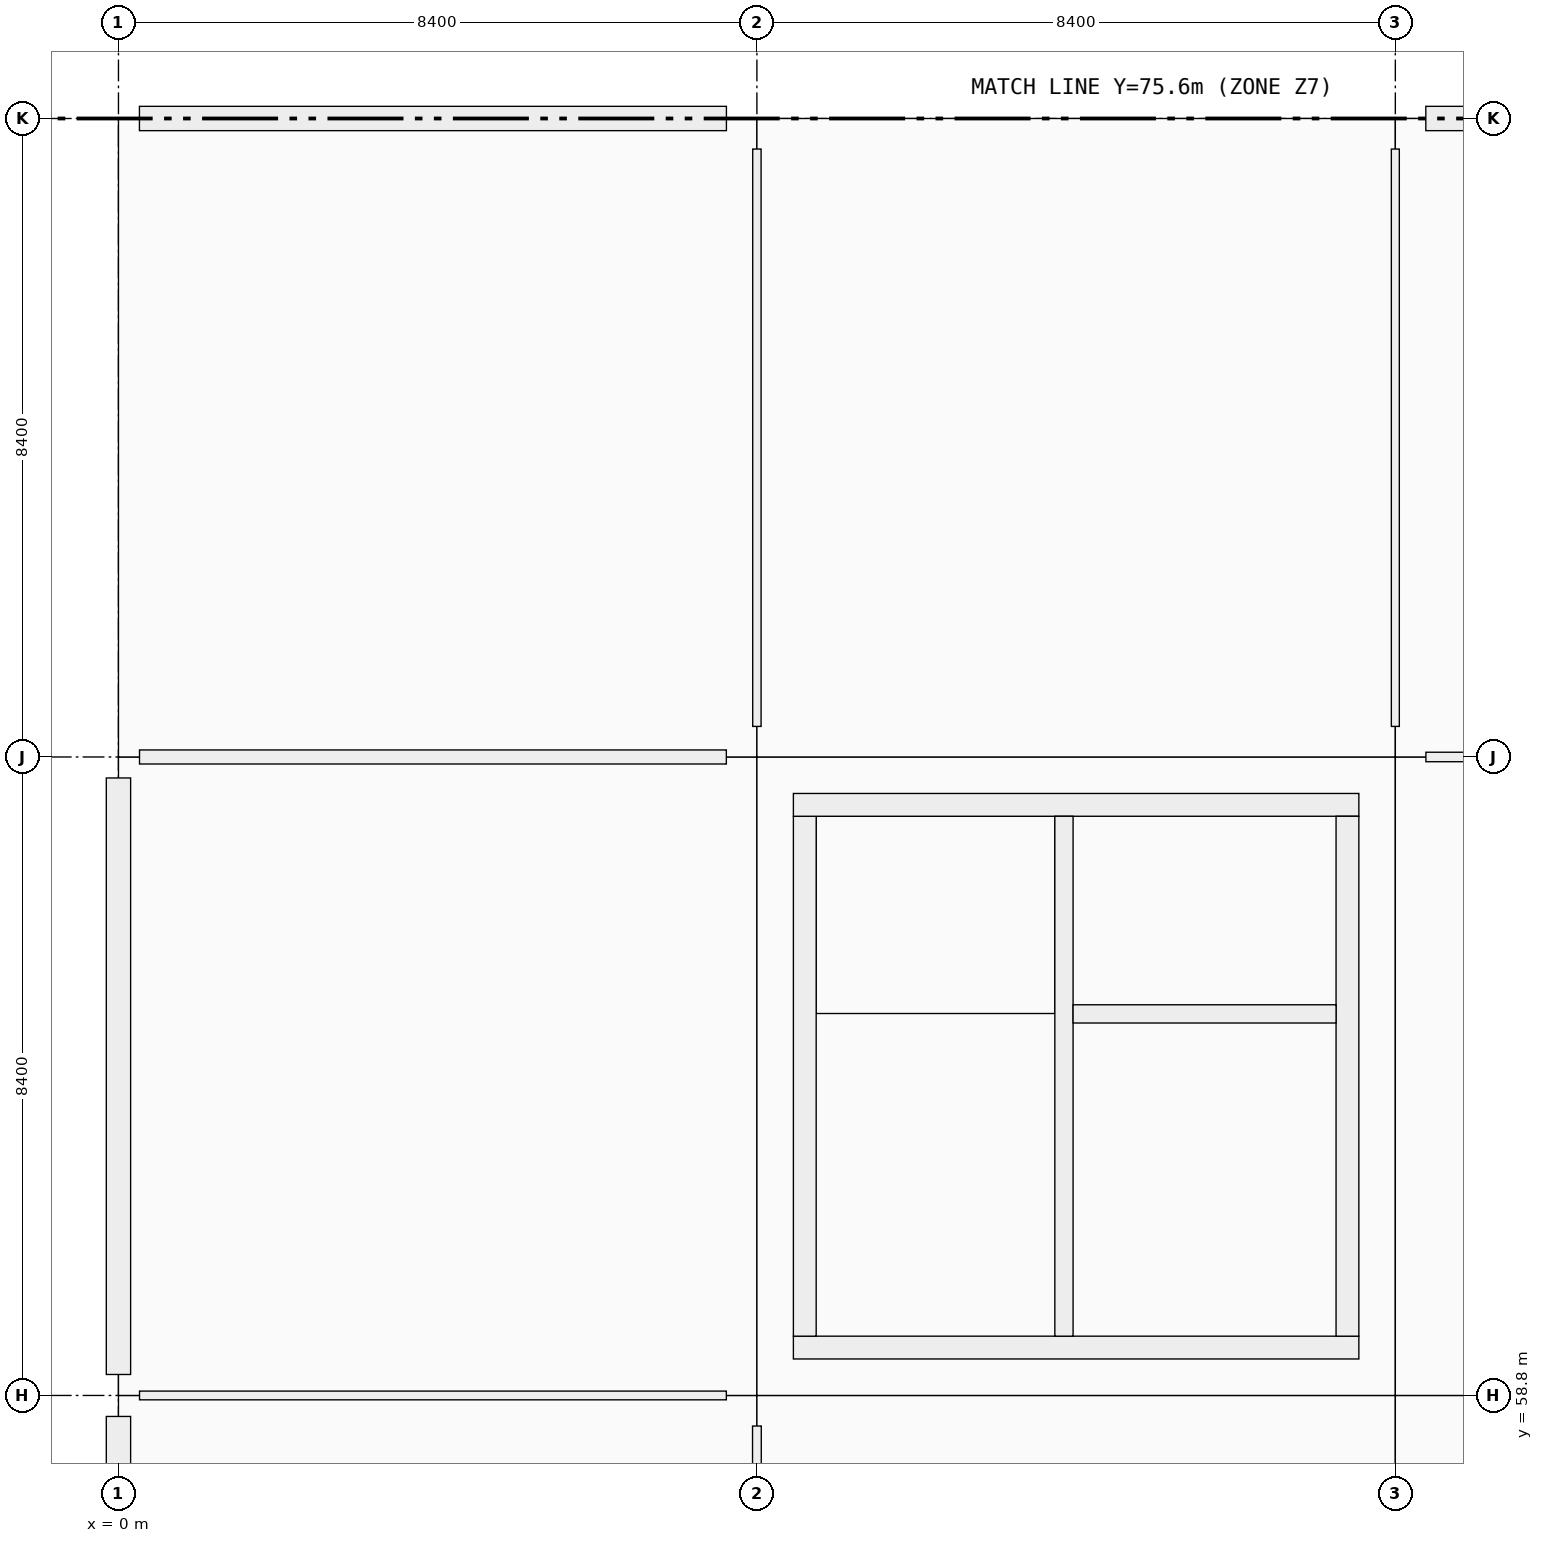
"""IFC4 building model, lengths in metres.
Left out: names, types, materials, properties, quantities, classifications, styles, units other than length and angle.
Written with IfcOpenShell. Run it as: python <this file> out.ifc"""

import sys

from ifc_helpers import new_model, si_unit, direction, frame, frame_2d, origin, origin_2d, place, context, subcontext, project, spatial, rectangle, extrude, element, fill, save


model = new_model("IFC4")
c1 = context("Model", 3, precision=1e-05, world=origin(), true_north=direction((0.0, 1.0)))
c2 = subcontext(c1, "Body", "Model", "MODEL_VIEW")
j1 = project(units=[si_unit("LENGTHUNIT", "METRE"), si_unit("PLANEANGLEUNIT", "RADIAN")], contexts=[c1])
p1 = place(None, origin())
s1 = spatial("IfcSite", under=j1, at=p1, CompositionType="ELEMENT")
p2 = place(p1, origin())
s2 = spatial("IfcBuilding", under=s1, at=p2, CompositionType="ELEMENT")
p3 = place(p2, frame((0.0, 0.0, 5.76)))
s3 = spatial("IfcBuildingStorey", under=s2, at=p3, CompositionType="ELEMENT", Elevation=5.76)
for number, where, z_axis, x_axis in (
    (1, (0.0, 58.8, 0.0), (0.0, 0.0, 1.0), (1.0, 0.0, 0.0)),
    (2, (0.0, 67.2, 0.0), (0.0, 0.0, 1.0), (1.0, 0.0, 0.0)),
    (3, (0.0, 75.6, 0.0), (0.0, 0.0, 1.0), (1.0, 0.0, 0.0)),
):
    element("IfcColumn", number, at=place(p3, frame(where, z_axis=z_axis, x_axis=x_axis)), inside=s3, PredefinedType="COLUMN", context=c2, shape_type="SweptSolid", body=[
        extrude(rectangle(XDim=0.55, YDim=0.55, at=origin_2d()), origin(), (0.0, 0.0, 1.0), 4.2),
    ])
for number, where, z_axis, x_axis in (
    (4, (8.4, 58.8, 0.0), (0.0, 0.0, 1.0), (1.0, 0.0, 0.0)),
    (5, (8.4, 67.2, 0.0), (0.0, 0.0, 1.0), (1.0, 0.0, 0.0)),
    (6, (8.4, 75.6, 0.0), (0.0, 0.0, 1.0), (1.0, 0.0, 0.0)),
    (7, (16.8, 58.8, 0.0), (0.0, 0.0, 1.0), (1.0, 0.0, 0.0)),
    (8, (16.8, 67.2, 0.0), (0.0, 0.0, 1.0), (1.0, 0.0, 0.0)),
    (9, (16.8, 75.6, 0.0), (0.0, 0.0, 1.0), (1.0, 0.0, 0.0)),
):
    element("IfcColumn", number, at=place(p3, frame(where, z_axis=z_axis, x_axis=x_axis)), inside=s3, PredefinedType="COLUMN", context=c2, shape_type="SweptSolid", body=[
        extrude(rectangle(XDim=0.8, YDim=0.8, at=origin_2d()), origin(), (0.0, 0.0, 1.0), 4.5),
    ])
p4 = place(p3, frame((0.0, 50.676, 0.0), z_axis=(0.0, 0.0, 1.0), x_axis=(0.0, 1.0, 0.0)))
e10 = element("IfcWall", 10, at=p4, inside=s3, PredefinedType="SOLIDWALL", context=c2, shape_type="SweptSolid", body=[
    extrude(rectangle(XDim=7.848, YDim=0.32, at=frame_2d((3.924, 0.0))), origin(), (0.0, 0.0, 1.0), 3.4),
])
p5 = place(p4, frame((2.674, 0.0, 0.9)))
e11 = element("IfcOpeningElement", 11, at=p5, cuts=e10, PredefinedType="OPENING", context=c2, shape_type="SweptSolid", body=[
    extrude(rectangle(XDim=2.5, YDim=1.65, at=frame_2d((1.25, 0.825))), frame((0.0, 0.16, 0.0), z_axis=(0.0, -1.0, 0.0), x_axis=(1.0, 0.0, 0.0)), (0.0, 0.0, 1.0), 0.32),
])
p6 = place(p3, frame((0.0, 59.076, 0.0), z_axis=(0.0, 0.0, 1.0), x_axis=(0.0, 1.0, 0.0)))
e12 = element("IfcWall", 12, at=p6, inside=s3, PredefinedType="SOLIDWALL", context=c2, shape_type="SweptSolid", body=[
    extrude(rectangle(XDim=7.848, YDim=0.32, at=frame_2d((3.924, 0.0))), origin(), (0.0, 0.0, 1.0), 3.4),
])
p7 = place(p6, frame((2.724, 0.0, 0.9)))
e13 = element("IfcOpeningElement", 13, at=p7, cuts=e12, PredefinedType="OPENING", context=c2, shape_type="SweptSolid", body=[
    extrude(rectangle(XDim=2.4, YDim=2.25, at=frame_2d((1.2, 1.125))), frame((0.0, 0.16, 0.0), z_axis=(0.0, -1.0, 0.0), x_axis=(1.0, 0.0, 0.0)), (0.0, 0.0, 1.0), 0.32),
])
p8 = place(p3, frame((0.276, 75.6, 0.0), z_axis=(0.0, 0.0, 1.0), x_axis=(1.0, 0.0, 0.0)))
e14 = element("IfcWall", 14, at=p8, inside=s3, PredefinedType="SOLIDWALL", context=c2, shape_type="SweptSolid", body=[
    extrude(rectangle(XDim=7.723, YDim=0.32, at=frame_2d((3.862, 0.0))), origin(), (0.0, 0.0, 1.0), 3.4),
])
p9 = place(p8, frame((2.861, 0.0, 0.9)))
e15 = element("IfcOpeningElement", 15, at=p9, cuts=e14, PredefinedType="OPENING", context=c2, shape_type="SweptSolid", body=[
    extrude(rectangle(XDim=2.0, YDim=2.25, at=frame_2d((1.0, 1.125))), frame((0.0, 0.16, 0.0), z_axis=(0.0, -1.0, 0.0), x_axis=(1.0, 0.0, 0.0)), (0.0, 0.0, 1.0), 0.32),
])
p10 = place(p3, frame((17.201, 75.6, 0.0), z_axis=(0.0, 0.0, 1.0), x_axis=(1.0, 0.0, 0.0)))
e16 = element("IfcWall", 16, at=p10, inside=s3, PredefinedType="SOLIDWALL", context=c2, shape_type="SweptSolid", body=[
    extrude(rectangle(XDim=7.598, YDim=0.32, at=frame_2d((3.799, 0.0))), origin(), (0.0, 0.0, 1.0), 3.4),
])
p11 = place(p10, frame((3.049, 0.0, 0.9)))
e17 = element("IfcOpeningElement", 17, at=p11, cuts=e16, PredefinedType="OPENING", context=c2, shape_type="SweptSolid", body=[
    extrude(rectangle(XDim=1.5, YDim=1.2, at=frame_2d((0.75, 0.6))), frame((0.0, 0.16, 0.0), z_axis=(0.0, -1.0, 0.0), x_axis=(1.0, 0.0, 0.0)), (0.0, 0.0, 1.0), 0.32),
])
p12 = place(p3, frame((16.32, 59.43, 0.0), z_axis=(0.0, 0.0, 1.0), x_axis=(-1.0, 0.0, 0.0)))
e18 = element("IfcWall", 18, at=p12, inside=s3, PredefinedType="SHEAR", context=c2, shape_type="SweptSolid", body=[
    extrude(rectangle(XDim=7.44, YDim=0.3, at=frame_2d((3.72, 0.0))), origin(), (0.0, 0.0, 1.0), 4.5),
])
p13 = place(p12, frame((1.28, 0.0, 0.0)))
e19 = element("IfcOpeningElement", 19, at=p13, cuts=e18, PredefinedType="OPENING", context=c2, shape_type="SweptSolid", body=[
    extrude(rectangle(XDim=1.5, YDim=2.15, at=frame_2d((0.75, 1.075))), frame((0.0, 0.15, 0.0), z_axis=(0.0, -1.0, 0.0), x_axis=(1.0, 0.0, 0.0)), (0.0, 0.0, 1.0), 0.3),
])
p14 = place(p3, frame((9.03, 59.58, 0.0), z_axis=(0.0, 0.0, 1.0), x_axis=(0.0, 1.0, 0.0)))
e20 = element("IfcWall", 20, at=p14, inside=s3, PredefinedType="SHEAR", context=c2, shape_type="SweptSolid", body=[
    extrude(rectangle(XDim=6.84, YDim=0.3, at=frame_2d((3.42, 0.0))), origin(), (0.0, 0.0, 1.0), 4.5),
])
p15 = place(p3, frame((8.88, 66.57, 0.0), z_axis=(0.0, 0.0, 1.0), x_axis=(1.0, 0.0, 0.0)))
e21 = element("IfcWall", 21, at=p15, inside=s3, PredefinedType="SHEAR", context=c2, shape_type="SweptSolid", body=[
    extrude(rectangle(XDim=7.44, YDim=0.3, at=frame_2d((3.72, 0.0))), origin(), (0.0, 0.0, 1.0), 4.5),
])
p16 = place(p3, frame((16.17, 66.42, 0.0), z_axis=(0.0, 0.0, 1.0), x_axis=(0.0, -1.0, 0.0)))
e22 = element("IfcWall", 22, at=p16, inside=s3, PredefinedType="SHEAR", context=c2, shape_type="SweptSolid", body=[
    extrude(rectangle(XDim=6.84, YDim=0.3, at=frame_2d((3.42, 0.0))), origin(), (0.0, 0.0, 1.0), 4.5),
])
p17 = place(p3, frame((12.44, 59.58, 0.0), z_axis=(0.0, 0.0, 1.0), x_axis=(0.0, 1.0, 0.0)))
e23 = element("IfcWall", 23, at=p17, inside=s3, PredefinedType="SHEAR", context=c2, shape_type="SweptSolid", body=[
    extrude(rectangle(XDim=6.84, YDim=0.24, at=frame_2d((3.42, 0.0))), origin(), (0.0, 0.0, 1.0), 4.5),
])
p18 = place(p17, frame((0.12, 0.0, 0.0)))
e24 = element("IfcOpeningElement", 24, at=p18, cuts=e23, PredefinedType="OPENING", context=c2, shape_type="SweptSolid", body=[
    extrude(rectangle(XDim=1.0, YDim=2.15, at=frame_2d((0.5, 1.075))), frame((0.0, 0.12, 0.0), z_axis=(0.0, -1.0, 0.0), x_axis=(1.0, 0.0, 0.0)), (0.0, 0.0, 1.0), 0.24),
])
p19 = place(p3, frame((12.56, 63.82, 0.0), z_axis=(0.0, 0.0, 1.0), x_axis=(1.0, 0.0, 0.0)))
e25 = element("IfcWall", 25, at=p19, inside=s3, PredefinedType="SHEAR", context=c2, shape_type="SweptSolid", body=[
    extrude(rectangle(XDim=3.46, YDim=0.24, at=frame_2d((1.73, 0.0))), origin(), (0.0, 0.0, 1.0), 4.5),
])
p20 = place(p19, frame((1.18, 0.0, 0.0)))
e26 = element("IfcOpeningElement", 26, at=p20, cuts=e25, PredefinedType="OPENING", context=c2, shape_type="SweptSolid", body=[
    extrude(rectangle(XDim=1.1, YDim=2.15, at=frame_2d((0.55, 1.075))), frame((0.0, 0.12, 0.0), z_axis=(0.0, -1.0, 0.0), x_axis=(1.0, 0.0, 0.0)), (0.0, 0.0, 1.0), 0.24),
])
p21 = place(p3, frame((0.277, 58.8, 0.0), z_axis=(0.0, 0.0, 1.0), x_axis=(1.0, 0.0, 0.0)))
e27 = element("IfcWall", 27, at=p21, inside=s3, PredefinedType="PARTITIONING", context=c2, shape_type="SweptSolid", body=[
    extrude(rectangle(XDim=7.721, YDim=0.115, at=frame_2d((3.86, 0.0))), origin(), (0.0, 0.0, 1.0), 2.4),
])
p22 = place(p21, frame((3.361, 0.0, 0.0)))
e28 = element("IfcOpeningElement", 28, at=p22, cuts=e27, PredefinedType="OPENING", context=c2, shape_type="SweptSolid", body=[
    extrude(rectangle(XDim=1.0, YDim=2.2, at=frame_2d((0.5, 1.1))), frame((0.0, 0.058, 0.0), z_axis=(0.0, -1.0, 0.0), x_axis=(1.0, 0.0, 0.0)), (0.0, 0.0, 1.0), 0.115),
])
p23 = place(p3, frame((0.277, 67.2, 0.0), z_axis=(0.0, 0.0, 1.0), x_axis=(1.0, 0.0, 0.0)))
e29 = element("IfcWall", 29, at=p23, inside=s3, PredefinedType="PARTITIONING", context=c2, shape_type="SweptSolid", body=[
    extrude(rectangle(XDim=7.721, YDim=0.185, at=frame_2d((3.86, 0.0))), origin(), (0.0, 0.0, 1.0), 2.4),
])
p24 = place(p23, frame((3.37, 0.0, 0.0)))
e30 = element("IfcOpeningElement", 30, at=p24, cuts=e29, PredefinedType="OPENING", context=c2, shape_type="SweptSolid", body=[
    extrude(rectangle(XDim=0.98, YDim=2.18, at=frame_2d((0.49, 1.09))), frame((0.0, 0.093, 0.0), z_axis=(0.0, -1.0, 0.0), x_axis=(1.0, 0.0, 0.0)), (0.0, 0.0, 1.0), 0.185),
])
p25 = place(p3, frame((17.202, 67.2, 0.0), z_axis=(0.0, 0.0, 1.0), x_axis=(1.0, 0.0, 0.0)))
e31 = element("IfcWall", 31, at=p25, inside=s3, PredefinedType="PARTITIONING", context=c2, shape_type="SweptSolid", body=[
    extrude(rectangle(XDim=7.596, YDim=0.125, at=frame_2d((3.798, 0.0))), origin(), (0.0, 0.0, 1.0), 2.4),
])
p26 = place(p25, frame((3.273, 0.0, 0.0)))
e32 = element("IfcOpeningElement", 32, at=p26, cuts=e31, PredefinedType="OPENING", context=c2, shape_type="SweptSolid", body=[
    extrude(rectangle(XDim=1.05, YDim=2.12, at=frame_2d((0.525, 1.06))), frame((0.0, 0.062, 0.0), z_axis=(0.0, -1.0, 0.0), x_axis=(1.0, 0.0, 0.0)), (0.0, 0.0, 1.0), 0.125),
])
p27 = place(p3, frame((8.4, 50.802, 0.0), z_axis=(0.0, 0.0, 1.0), x_axis=(0.0, 1.0, 0.0)))
e33 = element("IfcWall", 33, at=p27, inside=s3, PredefinedType="PARTITIONING", context=c2, shape_type="SweptSolid", body=[
    extrude(rectangle(XDim=7.596, YDim=0.115, at=frame_2d((3.798, 0.0))), origin(), (0.0, 0.0, 1.0), 2.4),
])
p28 = place(p27, frame((3.333, 0.0, 0.0)))
e34 = element("IfcOpeningElement", 34, at=p28, cuts=e33, PredefinedType="OPENING", context=c2, shape_type="SweptSolid", body=[
    extrude(rectangle(XDim=0.93, YDim=2.12, at=frame_2d((0.465, 1.06))), frame((0.0, 0.058, 0.0), z_axis=(0.0, -1.0, 0.0), x_axis=(1.0, 0.0, 0.0)), (0.0, 0.0, 1.0), 0.115),
])
p29 = place(p3, frame((8.4, 67.602, 0.0), z_axis=(0.0, 0.0, 1.0), x_axis=(0.0, 1.0, 0.0)))
e35 = element("IfcWall", 35, at=p29, inside=s3, PredefinedType="MOVABLE", context=c2, shape_type="SweptSolid", body=[
    extrude(rectangle(XDim=7.596, YDim=0.11, at=frame_2d((3.798, 0.0))), origin(), (0.0, 0.0, 1.0), 2.4),
])
p30 = place(p29, frame((3.318, 0.0, 0.0)))
e36 = element("IfcOpeningElement", 36, at=p30, cuts=e35, PredefinedType="OPENING", context=c2, shape_type="SweptSolid", body=[
    extrude(rectangle(XDim=0.96, YDim=2.18, at=frame_2d((0.48, 1.09))), frame((0.0, 0.055, 0.0), z_axis=(0.0, -1.0, 0.0), x_axis=(1.0, 0.0, 0.0)), (0.0, 0.0, 1.0), 0.11),
])
p31 = place(p3, frame((16.8, 67.602, 0.0), z_axis=(0.0, 0.0, 1.0), x_axis=(0.0, 1.0, 0.0)))
e37 = element("IfcWall", 37, at=p31, inside=s3, PredefinedType="PARTITIONING", context=c2, shape_type="SweptSolid", body=[
    extrude(rectangle(XDim=7.596, YDim=0.105, at=frame_2d((3.798, 0.0))), origin(), (0.0, 0.0, 1.0), 2.4),
])
p32 = place(p31, frame((3.313, 0.0, 0.0)))
e38 = element("IfcOpeningElement", 38, at=p32, cuts=e37, PredefinedType="OPENING", context=c2, shape_type="SweptSolid", body=[
    extrude(rectangle(XDim=0.97, YDim=2.12, at=frame_2d((0.485, 1.06))), frame((0.0, 0.052, 0.0), z_axis=(0.0, -1.0, 0.0), x_axis=(1.0, 0.0, 0.0)), (0.0, 0.0, 1.0), 0.105),
])
p33 = place(p7, origin())
e39 = element("IfcWindow", 39, at=p33, inside=s3, PartitioningType="SINGLE_PANEL", PredefinedType="WINDOW", context=c2, shape_type="SweptSolid", body=[
    extrude(rectangle(XDim=2.4, YDim=2.25, at=frame_2d((1.2, 1.125))), frame((0.0, 0.03, 0.0), z_axis=(0.0, -1.0, 0.0), x_axis=(1.0, 0.0, 0.0)), (0.0, 0.0, 1.0), 0.06),
])
fill(e13, e39)
p34 = place(p9, origin())
e40 = element("IfcWindow", 40, at=p34, inside=s3, PartitioningType="SINGLE_PANEL", PredefinedType="WINDOW", context=c2, shape_type="SweptSolid", body=[
    extrude(rectangle(XDim=2.0, YDim=2.25, at=frame_2d((1.0, 1.125))), frame((0.0, 0.03, 0.0), z_axis=(0.0, -1.0, 0.0), x_axis=(1.0, 0.0, 0.0)), (0.0, 0.0, 1.0), 0.06),
])
fill(e15, e40)
p35 = place(p18, origin())
e41 = element("IfcDoor", 41, at=p35, inside=s3, OperationType="SINGLE_SWING_LEFT", PredefinedType="DOOR", context=c2, shape_type="SweptSolid", body=[
    extrude(rectangle(XDim=1.0, YDim=2.15, at=frame_2d((0.5, 1.075))), frame((0.0, 0.025, 0.0), z_axis=(0.0, -1.0, 0.0), x_axis=(1.0, 0.0, 0.0)), (0.0, 0.0, 1.0), 0.05),
])
fill(e24, e41)
p36 = place(p13, origin())
e42 = element("IfcDoor", 42, at=p36, inside=s3, OperationType="DOUBLE_DOOR_SINGLE_SWING", PredefinedType="DOOR", context=c2, shape_type="SweptSolid", body=[
    extrude(rectangle(XDim=1.5, YDim=2.15, at=frame_2d((0.75, 1.075))), frame((0.0, 0.025, 0.0), z_axis=(0.0, -1.0, 0.0), x_axis=(1.0, 0.0, 0.0)), (0.0, 0.0, 1.0), 0.05),
])
fill(e19, e42)
p37 = place(p20, origin())
e43 = element("IfcDoor", 43, at=p37, inside=s3, OperationType="DOUBLE_DOOR_SLIDING", PredefinedType="DOOR", context=c2, shape_type="SweptSolid", body=[
    extrude(rectangle(XDim=1.1, YDim=2.15, at=frame_2d((0.55, 1.075))), frame((0.0, 0.025, 0.0), z_axis=(0.0, -1.0, 0.0), x_axis=(1.0, 0.0, 0.0)), (0.0, 0.0, 1.0), 0.05),
])
fill(e26, e43)
p38 = place(p22, origin())
e44 = element("IfcDoor", 44, at=p38, inside=s3, OperationType="SINGLE_SWING_LEFT", PredefinedType="DOOR", context=c2, shape_type="SweptSolid", body=[
    extrude(rectangle(XDim=1.0, YDim=2.2, at=frame_2d((0.5, 1.1))), frame((0.0, 0.025, 0.0), z_axis=(0.0, -1.0, 0.0), x_axis=(1.0, 0.0, 0.0)), (0.0, 0.0, 1.0), 0.05),
])
fill(e28, e44)
p39 = place(p24, origin())
e45 = element("IfcDoor", 45, at=p39, inside=s3, OperationType="SINGLE_SWING_RIGHT", PredefinedType="DOOR", context=c2, shape_type="SweptSolid", body=[
    extrude(rectangle(XDim=0.98, YDim=2.18, at=frame_2d((0.49, 1.09))), frame((0.0, 0.025, 0.0), z_axis=(0.0, -1.0, 0.0), x_axis=(1.0, 0.0, 0.0)), (0.0, 0.0, 1.0), 0.05),
])
fill(e30, e45)
p40 = place(p30, origin())
e46 = element("IfcDoor", 46, at=p40, inside=s3, OperationType="SINGLE_SWING_LEFT", PredefinedType="DOOR", context=c2, shape_type="SweptSolid", body=[
    extrude(rectangle(XDim=0.96, YDim=2.18, at=frame_2d((0.48, 1.09))), frame((0.0, 0.025, 0.0), z_axis=(0.0, -1.0, 0.0), x_axis=(1.0, 0.0, 0.0)), (0.0, 0.0, 1.0), 0.05),
])
fill(e36, e46)
p41 = place(p32, origin())
e47 = element("IfcDoor", 47, at=p41, inside=s3, OperationType="SINGLE_SWING_RIGHT", PredefinedType="DOOR", context=c2, shape_type="SweptSolid", body=[
    extrude(rectangle(XDim=0.97, YDim=2.12, at=frame_2d((0.485, 1.06))), frame((0.0, 0.025, 0.0), z_axis=(0.0, -1.0, 0.0), x_axis=(1.0, 0.0, 0.0)), (0.0, 0.0, 1.0), 0.05),
])
fill(e38, e47)
save(model, sys.argv[1])
